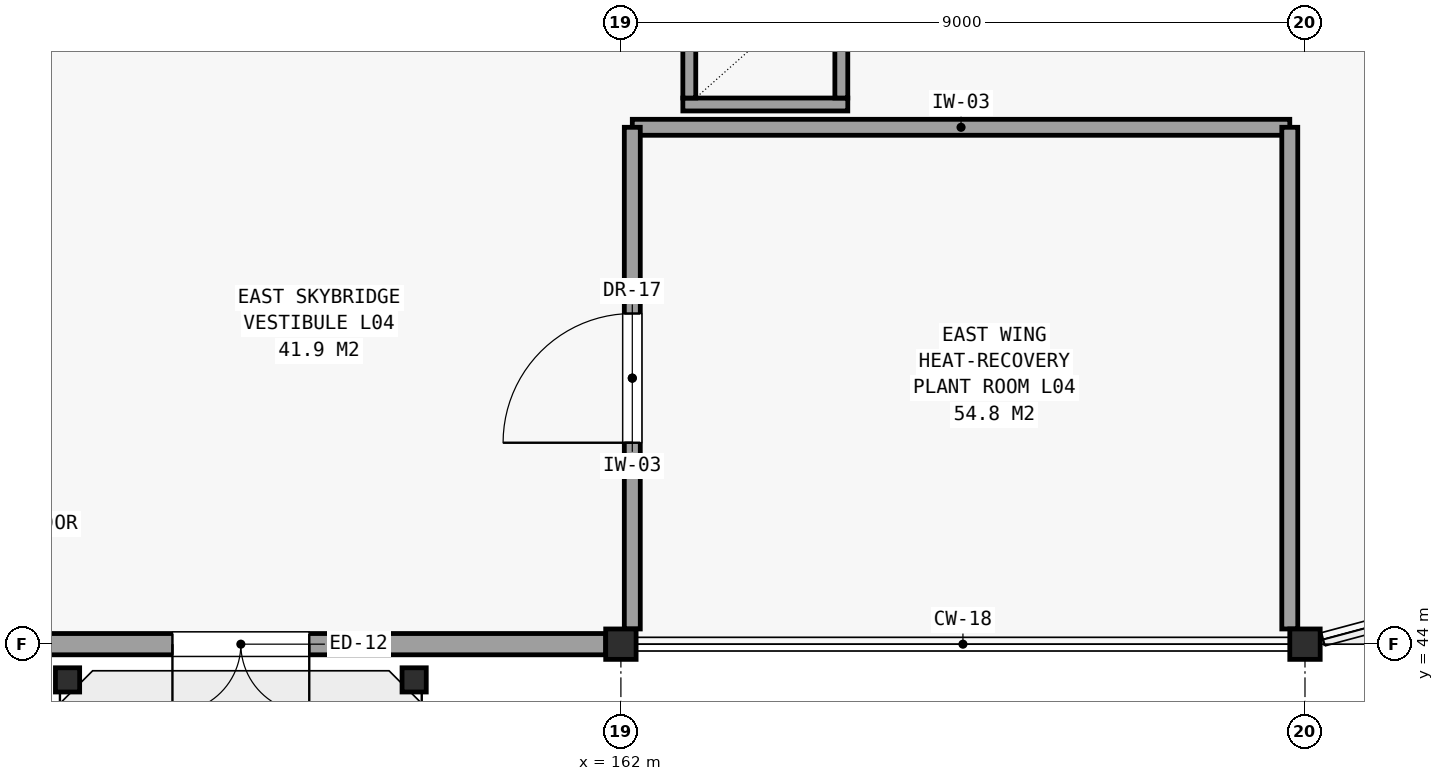
"""IFC4 building model, lengths in metres.
Left out: names, types, materials, properties, quantities, classifications, styles, units other than length and angle.
Written with IfcOpenShell. Run it as: python <this file> out.ifc"""

import sys

from ifc_helpers import new_model, si_unit, direction, frame, frame_2d, origin, origin_2d, place, context, subcontext, project, spatial, rectangle, hollow_rectangle, hollow_circle, extrude, element, fill, save


model = new_model("IFC4")
c1 = context("Model", 3, precision=1e-05, world=origin(), true_north=direction((0.0, 1.0)))
c2 = subcontext(c1, "Body", "Model", "MODEL_VIEW")
j1 = project(units=[si_unit("LENGTHUNIT", "METRE"), si_unit("PLANEANGLEUNIT", "RADIAN")], contexts=[c1])
p1 = place(None, origin())
s1 = spatial("IfcSite", under=j1, at=p1, CompositionType="ELEMENT")
p2 = place(p1, origin())
s2 = spatial("IfcBuilding", under=s1, at=p2, CompositionType="ELEMENT")
p3 = place(p2, frame((0.0, 0.0, 17.7)))
s3 = spatial("IfcBuildingStorey", under=s2, at=p3, CompositionType="ELEMENT", Elevation=17.7)
for number, where, z_axis, x_axis in (
    (1, (154.72, 43.53, 0.0), (0.0, 0.0, 1.0), (1.0, 0.0, 0.0)),
    (2, (159.28, 43.53, 0.0), (0.0, 0.0, 1.0), (1.0, 0.0, 0.0)),
):
    element("IfcColumn", number, at=place(p3, frame(where, z_axis=z_axis, x_axis=x_axis)), inside=s3, PredefinedType="COLUMN", context=c2, shape_type="SweptSolid", body=[
        extrude(hollow_circle(Radius=0.159, WallThickness=0.01, at=origin_2d()), origin(), (0.0, 0.0, 1.0), 4.06),
    ])
for number, where, z_axis, x_axis in (
    (3, (162.0, 44.0, 0.0), (0.0, 0.0, 1.0), (1.0, 0.0, 0.0)),
    (4, (171.0, 44.0, 0.0), (0.0, 0.0, 1.0), (1.0, 0.0, 0.0)),
):
    element("IfcColumn", number, at=place(p3, frame(where, z_axis=z_axis, x_axis=x_axis)), inside=s3, PredefinedType="COLUMN", context=c2, shape_type="SweptSolid", body=[
        extrude(hollow_rectangle(XDim=0.4, YDim=0.4, WallThickness=0.019, at=origin_2d()), origin(), (0.0, 0.0, 1.0), 4.2),
    ])
p4 = place(p3, frame((153.2, 44.0, 0.0), z_axis=(0.0, 0.0, 1.0), x_axis=(1.0, 0.0, 0.0)))
e5 = element("IfcWall", 5, at=p4, inside=s3, PredefinedType="SOLIDWALL", context=c2, shape_type="SweptSolid", body=[
    extrude(rectangle(XDim=8.6, YDim=0.28, at=frame_2d((4.3, 0.0))), origin(), (0.0, 0.0, 1.0), 3.24),
])
p5 = place(p4, frame((4.7, 0.0, 0.0), z_axis=(0.0, 0.0, 1.0), x_axis=(-1.0, 0.0, 0.0)))
e6 = element("IfcOpeningElement", 6, at=p5, cuts=e5, PredefinedType="OPENING", context=c2, shape_type="SweptSolid", body=[
    extrude(rectangle(XDim=1.8, YDim=2.2, at=frame_2d((0.9, 1.1))), frame((0.0, 0.151, 0.0), z_axis=(0.0, -1.0, 0.0), x_axis=(1.0, 0.0, 0.0)), (0.0, 0.0, 1.0), 0.302),
])
p6 = place(p3, frame((162.815, 51.1, 0.0), z_axis=(0.0, 0.0, 1.0), x_axis=(1.0, 0.0, 0.0)))
e7 = element("IfcWall", 7, at=p6, inside=s3, PredefinedType="PARTITIONING", context=c2, shape_type="SweptSolid", body=[
    extrude(rectangle(XDim=2.17, YDim=0.17, at=frame_2d((1.085, 0.0))), origin(), (0.0, 0.0, 1.0), 3.92),
])
for number, where, z_axis, x_axis in (
    (8, (162.9, 51.185, 0.0), (0.0, 0.0, 1.0), (0.0, 1.0, 0.0)),
    (9, (164.9, 51.185, 0.0), (0.0, 0.0, 1.0), (0.0, 1.0, 0.0)),
):
    element("IfcWall", number, at=place(p3, frame(where, z_axis=z_axis, x_axis=x_axis)), inside=s3, PredefinedType="PARTITIONING", context=c2, shape_type="SweptSolid", body=[
        extrude(rectangle(XDim=1.63, YDim=0.17, at=frame_2d((0.815, 0.0))), origin(), (0.0, 0.0, 1.0), 3.24),
    ])
p7 = place(p3, frame((162.15, 50.8, 0.0), z_axis=(0.0, 0.0, 1.0), x_axis=(1.0, 0.0, 0.0)))
e10 = element("IfcWall", 10, at=p7, inside=s3, PredefinedType="PARTITIONING", context=c2, shape_type="SweptSolid", body=[
    extrude(rectangle(XDim=8.65, YDim=0.21, at=frame_2d((4.325, 0.0))), origin(), (0.0, 0.0, 1.0), 3.29),
])
p8 = place(p3, frame((162.15, 44.2, 0.0), z_axis=(0.0, 0.0, 1.0), x_axis=(0.0, 1.0, 0.0)))
e11 = element("IfcWall", 11, at=p8, inside=s3, PredefinedType="PARTITIONING", context=c2, shape_type="SweptSolid", body=[
    extrude(rectangle(XDim=6.6, YDim=0.21, at=frame_2d((3.3, 0.0))), origin(), (0.0, 0.0, 1.0), 3.24),
])
p9 = place(p8, frame((2.45, 0.0, 0.0)))
e12 = element("IfcOpeningElement", 12, at=p9, cuts=e11, PredefinedType="OPENING", context=c2, shape_type="SweptSolid", body=[
    extrude(rectangle(XDim=1.7, YDim=2.4, at=frame_2d((0.85, 1.2))), frame((0.0, 0.116, 0.0), z_axis=(0.0, -1.0, 0.0), x_axis=(1.0, 0.0, 0.0)), (0.0, 0.0, 1.0), 0.232),
])
p10 = place(p3, frame((170.8, 44.2, 0.0), z_axis=(0.0, 0.0, 1.0), x_axis=(0.0, 1.0, 0.0)))
e13 = element("IfcWall", 13, at=p10, inside=s3, PredefinedType="PARTITIONING", context=c2, shape_type="SweptSolid", body=[
    extrude(rectangle(XDim=6.6, YDim=0.21, at=frame_2d((3.3, 0.0))), origin(), (0.0, 0.0, 1.0), 3.24),
])
p11 = place(p5, origin())
e14 = element("IfcDoor", 14, at=p11, inside=s3, OperationType="SINGLE_SWING_LEFT", PredefinedType="DOOR", context=c2, shape_type="SweptSolid", body=[
    extrude(rectangle(XDim=1.8, YDim=2.2, at=frame_2d((0.9, 1.1))), frame((0.0, 0.025, 0.0), z_axis=(0.0, -1.0, 0.0), x_axis=(1.0, 0.0, 0.0)), (0.0, 0.0, 1.0), 0.05),
])
fill(e6, e14)
p12 = place(p9, origin())
e15 = element("IfcDoor", 15, at=p12, inside=s3, OperationType="SINGLE_SWING_LEFT", PredefinedType="DOOR", context=c2, shape_type="SweptSolid", body=[
    extrude(rectangle(XDim=1.7, YDim=2.4, at=frame_2d((0.85, 1.2))), frame((0.0, 0.025, 0.0), z_axis=(0.0, -1.0, 0.0), x_axis=(1.0, 0.0, 0.0)), (0.0, 0.0, 1.0), 0.05),
])
fill(e12, e15)
save(model, sys.argv[1])
